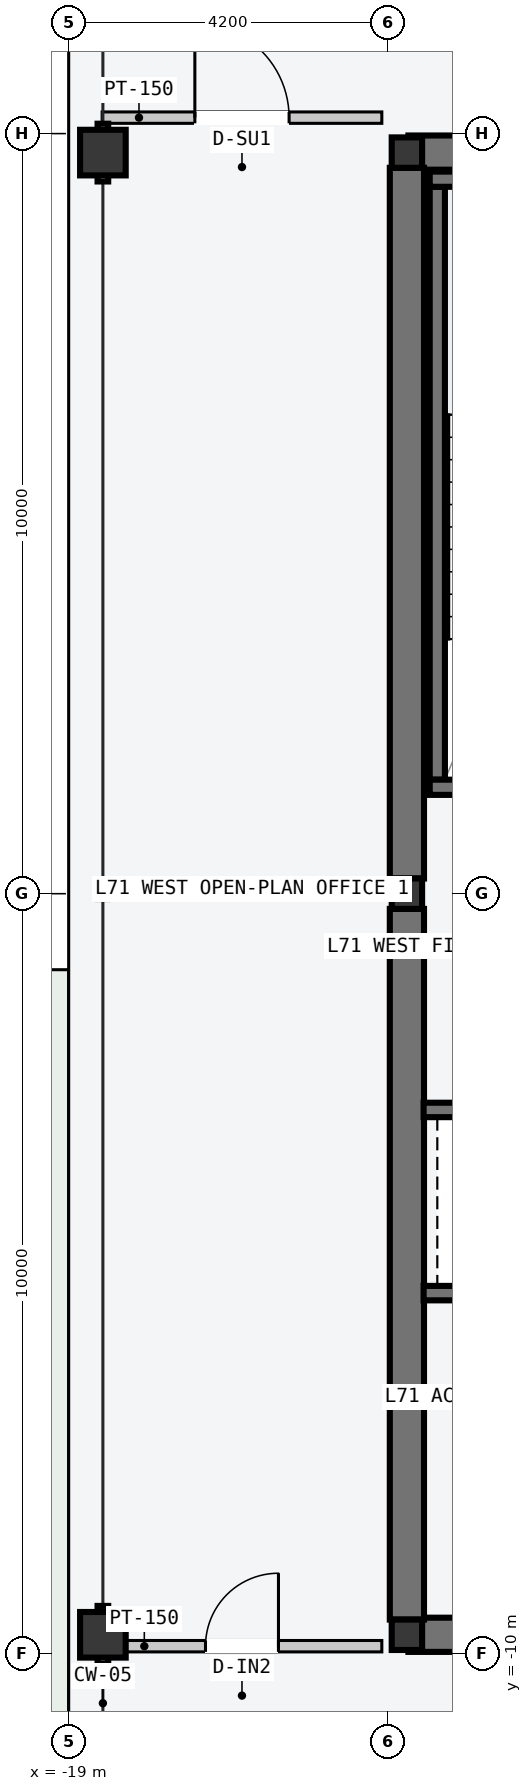
"""IFC4 building model, lengths in metres.
Left out: names, types, materials, properties, quantities, classifications, styles, units other than length and angle.
Written with IfcOpenShell. Run it as: python <this file> out.ifc"""

import sys

from ifc_helpers import new_model, si_unit, direction, frame, frame_2d, origin, origin_2d, place, context, subcontext, project, spatial, rectangle, hollow_rectangle, i_section, extrude, element, fill, save


model = new_model("IFC4")
c1 = context("Model", 3, precision=1e-05, world=origin(), true_north=direction((0.0, 1.0)))
c2 = subcontext(c1, "Body", "Model", "MODEL_VIEW")
j1 = project(units=[si_unit("LENGTHUNIT", "METRE"), si_unit("PLANEANGLEUNIT", "RADIAN")], contexts=[c1])
p1 = place(None, origin())
s1 = spatial("IfcSite", under=j1, at=p1, CompositionType="ELEMENT")
p2 = place(p1, origin())
s2 = spatial("IfcBuilding", under=s1, at=p2, CompositionType="ELEMENT")
p3 = place(p2, frame((0.0, 0.0, 268.8)))
s3 = spatial("IfcBuildingStorey", under=s2, at=p3, CompositionType="ELEMENT", Elevation=268.8)
for number, where, z_axis, x_axis in (
    (1, (-14.53, -9.75, -0.2), (0.0, 0.0, 1.0), (1.0, 0.0, 0.0)),
    (2, (-14.53, 9.75, -0.2), (0.0, 0.0, 1.0), (1.0, 0.0, 0.0)),
):
    element("IfcWall", number, at=place(p3, frame(where, z_axis=z_axis, x_axis=x_axis)), inside=s3, PredefinedType="SHEAR", context=c2, shape_type="SweptSolid", body=[
        extrude(rectangle(XDim=6.46, YDim=0.45, at=frame_2d((3.23, 0.0))), origin(), (0.0, 0.0, 1.0), 3.6),
    ])
for number, where, z_axis, x_axis in (
    (3, (-14.55, -9.55, -0.2), (0.0, 0.0, 1.0), (0.0, 1.0, 0.0)),
    (4, (-14.55, 0.2, -0.2), (0.0, 0.0, 1.0), (0.0, 1.0, 0.0)),
):
    element("IfcWall", number, at=place(p3, frame(where, z_axis=z_axis, x_axis=x_axis)), inside=s3, PredefinedType="SHEAR", context=c2, shape_type="SweptSolid", body=[
        extrude(rectangle(XDim=9.35, YDim=0.45, at=frame_2d((4.675, 0.0))), origin(), (0.0, 0.0, 1.0), 3.6),
    ])
p4 = place(p3, frame((-14.15, 1.5, -0.2), z_axis=(0.0, 0.0, 1.0), x_axis=(0.0, 1.0, 0.0)))
e5 = element("IfcWall", 5, at=p4, inside=s3, PredefinedType="SOLIDWALL", context=c2, shape_type="SweptSolid", body=[
    extrude(rectangle(XDim=7.8, YDim=0.2, at=frame_2d((3.9, 0.0))), origin(), (0.0, 0.0, 1.0), 3.6),
])
p5 = place(p3, frame((-14.25, 1.4, -0.2), z_axis=(0.0, 0.0, 1.0), x_axis=(1.0, 0.0, 0.0)))
e6 = element("IfcWall", 6, at=p5, inside=s3, PredefinedType="SOLIDWALL", context=c2, shape_type="SweptSolid", body=[
    extrude(rectangle(XDim=3.72, YDim=0.2, at=frame_2d((1.86, 0.0))), origin(), (0.0, 0.0, 1.0), 3.6),
])
p6 = place(p5, frame((1.5, 0.0, 0.2)))
e7 = element("IfcOpeningElement", 7, at=p6, cuts=e6, PredefinedType="OPENING", context=c2, shape_type="SweptSolid", body=[
    extrude(rectangle(XDim=1.12, YDim=2.18, at=frame_2d((0.56, 1.09))), frame((0.0, 0.11, 0.0), z_axis=(0.0, -1.0, 0.0), x_axis=(1.0, 0.0, 0.0)), (0.0, 0.0, 1.0), 0.22),
])
p7 = place(p3, frame((-14.25, 9.4, -0.2), z_axis=(0.0, 0.0, 1.0), x_axis=(1.0, 0.0, 0.0)))
e8 = element("IfcWall", 8, at=p7, inside=s3, PredefinedType="SOLIDWALL", context=c2, shape_type="SweptSolid", body=[
    extrude(rectangle(XDim=3.72, YDim=0.2, at=frame_2d((1.86, 0.0))), origin(), (0.0, 0.0, 1.0), 3.6),
])
for number, where, z_axis, x_axis in (
    (9, (-14.55, -9.75, 0.0), (0.0, 0.0, 1.0), (1.0, 0.0, 0.0)),
    (10, (-14.55, 0.0, 0.0), (0.0, 0.0, 1.0), (1.0, 0.0, 0.0)),
    (11, (-14.55, 9.75, 0.0), (0.0, 0.0, 1.0), (1.0, 0.0, 0.0)),
):
    element("IfcColumn", number, at=place(p3, frame(where, z_axis=z_axis, x_axis=x_axis)), inside=s3, PredefinedType="COLUMN", context=c2, shape_type="SweptSolid", body=[
        extrude(i_section(OverallWidth=0.4, OverallDepth=0.4, WebThickness=0.013, FlangeThickness=0.021, at=origin_2d()), origin(), (0.0, 0.0, 1.0), 3.6),
    ])
for number, where, z_axis, x_axis in (
    (12, (-18.55, -9.75, 0.0), (0.0, 0.0, 1.0), (0.0, 1.0, 0.0)),
    (13, (-18.55, 9.75, 0.0), (0.0, 0.0, 1.0), (0.0, 1.0, 0.0)),
):
    element("IfcColumn", number, at=place(p3, frame(where, z_axis=z_axis, x_axis=x_axis)), inside=s3, PredefinedType="COLUMN", context=c2, shape_type="SweptSolid", body=[
        extrude(hollow_rectangle(XDim=0.6, YDim=0.6, WallThickness=0.025, at=origin_2d()), origin(), (0.0, 0.0, 1.0), 3.6),
    ])
p8 = place(p3, frame((-14.33, -2.845, -0.2), z_axis=(0.0, 0.0, 1.0), x_axis=(1.0, 0.0, 0.0)))
e14 = element("IfcWall", 14, at=p8, inside=s3, PredefinedType="SOLIDWALL", context=c2, shape_type="SweptSolid", body=[
    extrude(rectangle(XDim=2.68, YDim=0.19, at=frame_2d((1.34, 0.0))), origin(), (0.0, 0.0, 1.0), 3.6),
])
p9 = place(p8, frame((0.83, 0.0, 0.2)))
e15 = element("IfcOpeningElement", 15, at=p9, cuts=e14, PredefinedType="OPENING", context=c2, shape_type="SweptSolid", body=[
    extrude(rectangle(XDim=1.2, YDim=2.2, at=frame_2d((0.6, 1.1))), frame((0.0, 0.105, 0.0), z_axis=(0.0, -1.0, 0.0), x_axis=(1.0, 0.0, 0.0)), (0.0, 0.0, 1.0), 0.21),
])
p10 = place(p3, frame((-14.33, -5.255, -0.2), z_axis=(0.0, 0.0, 1.0), x_axis=(1.0, 0.0, 0.0)))
e16 = element("IfcWall", 16, at=p10, inside=s3, PredefinedType="SOLIDWALL", context=c2, shape_type="SweptSolid", body=[
    extrude(rectangle(XDim=2.68, YDim=0.19, at=frame_2d((1.34, 0.0))), origin(), (0.0, 0.0, 1.0), 3.6),
])
p11 = place(p3, frame((-18.56, 10.21, 0.0), z_axis=(0.0, 0.0, 1.0), x_axis=(1.0, 0.0, 0.0)))
e17 = element("IfcWall", 17, at=p11, inside=s3, PredefinedType="PARTITIONING", context=c2, shape_type="SweptSolid", body=[
    extrude(rectangle(XDim=3.68, YDim=0.15, at=frame_2d((1.84, 0.0))), origin(), (0.0, 0.0, 1.0), 3.4),
])
p12 = place(p11, frame((1.22, 0.0, 0.0)))
e18 = element("IfcOpeningElement", 18, at=p12, cuts=e17, PredefinedType="OPENING", context=c2, shape_type="SweptSolid", body=[
    extrude(rectangle(XDim=1.24, YDim=2.24, at=frame_2d((0.62, 1.12))), frame((0.0, 0.085, 0.0), z_axis=(0.0, -1.0, 0.0), x_axis=(1.0, 0.0, 0.0)), (0.0, 0.0, 1.0), 0.17),
])
p13 = place(p3, frame((-18.56, -9.9, 0.0), z_axis=(0.0, 0.0, 1.0), x_axis=(1.0, 0.0, 0.0)))
e19 = element("IfcWall", 19, at=p13, inside=s3, PredefinedType="PARTITIONING", context=c2, shape_type="SweptSolid", body=[
    extrude(rectangle(XDim=3.68, YDim=0.15, at=frame_2d((1.84, 0.0))), origin(), (0.0, 0.0, 1.0), 3.4),
])
p14 = place(p13, frame((1.36, 0.0, 0.0)))
e20 = element("IfcOpeningElement", 20, at=p14, cuts=e19, PredefinedType="OPENING", context=c2, shape_type="SweptSolid", body=[
    extrude(rectangle(XDim=0.96, YDim=2.18, at=frame_2d((0.48, 1.09))), frame((0.0, 0.085, 0.0), z_axis=(0.0, -1.0, 0.0), x_axis=(1.0, 0.0, 0.0)), (0.0, 0.0, 1.0), 0.17),
])
p15 = place(p12, origin())
e21 = element("IfcDoor", 21, at=p15, inside=s3, OperationType="SINGLE_SWING_LEFT", PredefinedType="DOOR", context=c2, shape_type="SweptSolid", body=[
    extrude(rectangle(XDim=1.24, YDim=2.24, at=frame_2d((0.62, 1.12))), frame((0.0, 0.025, 0.0), z_axis=(0.0, -1.0, 0.0), x_axis=(1.0, 0.0, 0.0)), (0.0, 0.0, 1.0), 0.05),
])
fill(e18, e21)
p16 = place(p14, origin())
e22 = element("IfcDoor", 22, at=p16, inside=s3, OperationType="SINGLE_SWING_RIGHT", PredefinedType="DOOR", context=c2, shape_type="SweptSolid", body=[
    extrude(rectangle(XDim=0.96, YDim=2.18, at=frame_2d((0.48, 1.09))), frame((0.0, 0.025, 0.0), z_axis=(0.0, -1.0, 0.0), x_axis=(1.0, 0.0, 0.0)), (0.0, 0.0, 1.0), 0.05),
])
fill(e20, e22)
save(model, sys.argv[1])
